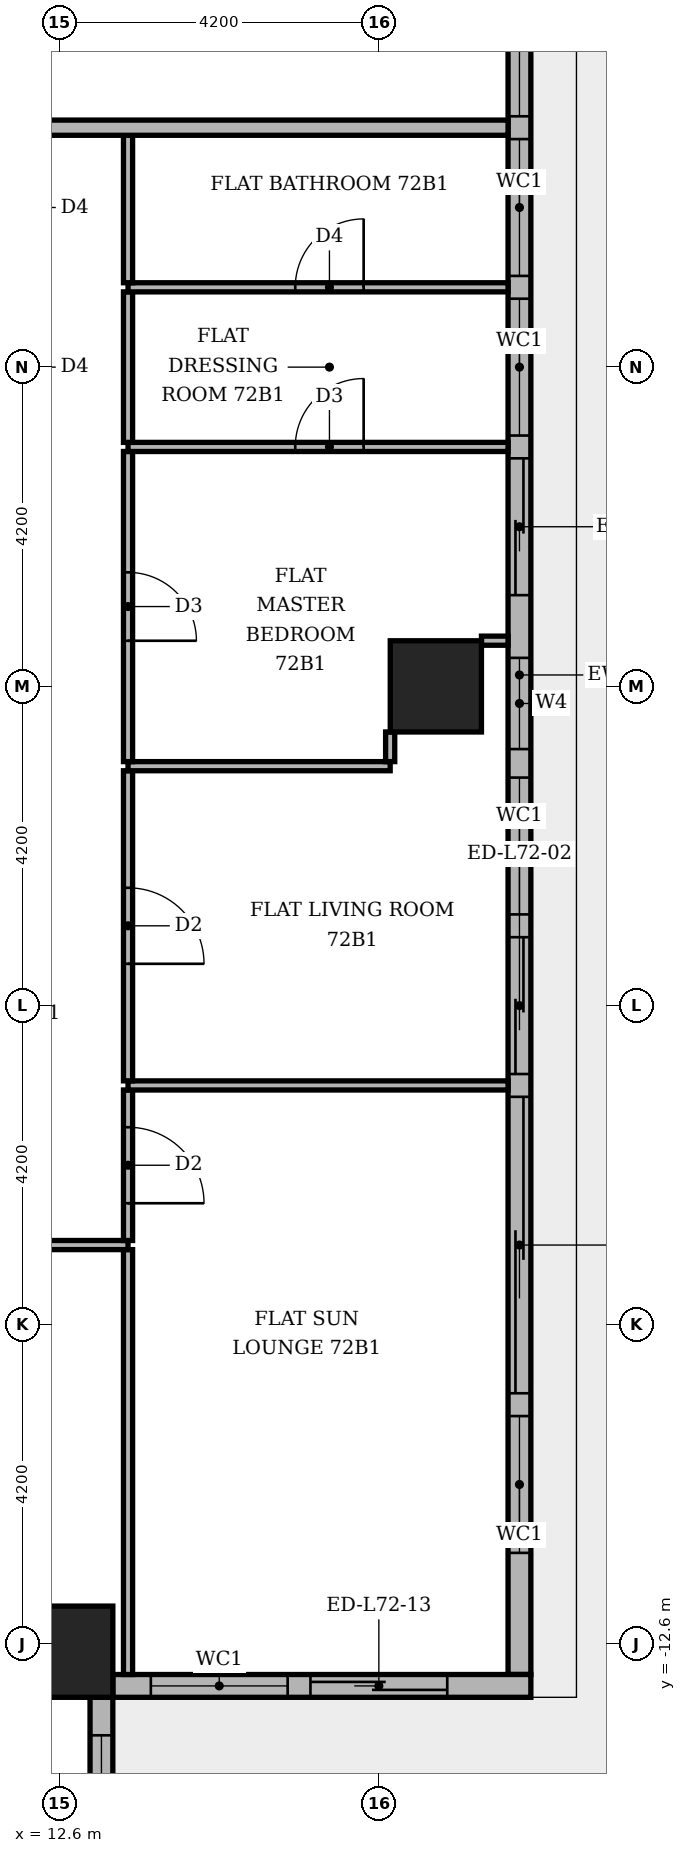
"""IFC4 building model, lengths in metres.
Left out: names, types, materials, properties, quantities, classifications, styles, units other than length and angle.
Written with IfcOpenShell. Run it as: python <this file> out.ifc"""

import sys

from ifc_helpers import new_model, si_unit, direction, frame, frame_2d, origin, origin_2d, place, context, subcontext, project, spatial, rectangle, extrude, element, fill, save


model = new_model("IFC4")
c1 = context("Model", 3, precision=1e-05, world=origin(), true_north=direction((0.0, 1.0)))
c2 = subcontext(c1, "Body", "Model", "MODEL_VIEW")
j1 = project(units=[si_unit("LENGTHUNIT", "METRE"), si_unit("PLANEANGLEUNIT", "RADIAN")], contexts=[c1])
p1 = place(None, origin())
s1 = spatial("IfcSite", under=j1, at=p1, CompositionType="ELEMENT")
p2 = place(p1, origin())
s2 = spatial("IfcBuilding", under=s1, at=p2, CompositionType="ELEMENT")
p3 = place(p2, frame((0.0, 0.0, 300.6)))
s3 = spatial("IfcBuildingStorey", under=s2, at=p3, CompositionType="ELEMENT", Elevation=300.6)
for number, where, z_axis, x_axis in (
    (1, (17.55, 0.0, -0.35), (0.0, 0.0, 1.0), (1.0, 0.0, 0.0)),
    (2, (12.7, -12.7, -0.35), (0.0, 0.0, 1.0), (1.0, 0.0, 0.0)),
):
    element("IfcColumn", number, at=place(p3, frame(where, z_axis=z_axis, x_axis=x_axis)), inside=s3, PredefinedType="COLUMN", context=c2, shape_type="SweptSolid", body=[
        extrude(rectangle(XDim=1.2, YDim=1.2, at=origin_2d()), origin(), (0.0, 0.0, 1.0), 4.25),
    ])
p4 = place(p3, frame((18.65, -13.0, 0.0), z_axis=(0.0, 0.0, 1.0), x_axis=(0.0, 1.0, 0.0)))
e3 = element("IfcWall", 3, at=p4, inside=s3, PredefinedType="STANDARD", context=c2, shape_type="SweptSolid", body=[
    extrude(rectangle(XDim=26.3, YDim=0.3, at=frame_2d((13.15, 0.0))), origin(), (0.0, 0.0, 1.0), 3.55),
])
p5 = place(p4, frame((1.6, 0.0, 0.6)))
e4 = element("IfcOpeningElement", 4, at=p5, cuts=e3, PredefinedType="OPENING", context=c2, shape_type="SweptSolid", body=[
    extrude(rectangle(XDim=1.8, YDim=2.4, at=frame_2d((0.9, 1.2))), frame((0.0, 0.16, 0.0), z_axis=(0.0, -1.0, 0.0), x_axis=(1.0, 0.0, 0.0)), (0.0, 0.0, 1.0), 0.32),
])
p6 = place(p4, frame((3.7, 0.0, 0.0)))
e5 = element("IfcOpeningElement", 5, at=p6, cuts=e3, PredefinedType="OPENING", context=c2, shape_type="SweptSolid", body=[
    extrude(rectangle(XDim=3.9, YDim=2.4, at=frame_2d((1.95, 1.2))), frame((0.0, 0.16, 0.0), z_axis=(0.0, -1.0, 0.0), x_axis=(1.0, 0.0, 0.0)), (0.0, 0.0, 1.0), 0.32),
])
p7 = place(p4, frame((7.9, 0.0, 0.0)))
e6 = element("IfcOpeningElement", 6, at=p7, cuts=e3, PredefinedType="OPENING", context=c2, shape_type="SweptSolid", body=[
    extrude(rectangle(XDim=1.8, YDim=2.4, at=frame_2d((0.9, 1.2))), frame((0.0, 0.16, 0.0), z_axis=(0.0, -1.0, 0.0), x_axis=(1.0, 0.0, 0.0)), (0.0, 0.0, 1.0), 0.32),
])
p8 = place(p4, frame((10.0, 0.0, 0.6)))
e7 = element("IfcOpeningElement", 7, at=p8, cuts=e3, PredefinedType="OPENING", context=c2, shape_type="SweptSolid", body=[
    extrude(rectangle(XDim=1.8, YDim=2.4, at=frame_2d((0.9, 1.2))), frame((0.0, 0.16, 0.0), z_axis=(0.0, -1.0, 0.0), x_axis=(1.0, 0.0, 0.0)), (0.0, 0.0, 1.0), 0.32),
])
p9 = place(p4, frame((14.2, 0.0, 0.0)))
e8 = element("IfcOpeningElement", 8, at=p9, cuts=e3, PredefinedType="OPENING", context=c2, shape_type="SweptSolid", body=[
    extrude(rectangle(XDim=1.8, YDim=2.4, at=frame_2d((0.9, 1.2))), frame((0.0, 0.16, 0.0), z_axis=(0.0, -1.0, 0.0), x_axis=(1.0, 0.0, 0.0)), (0.0, 0.0, 1.0), 0.32),
])
p10 = place(p4, frame((16.3, 0.0, 0.6)))
e9 = element("IfcOpeningElement", 9, at=p10, cuts=e3, PredefinedType="OPENING", context=c2, shape_type="SweptSolid", body=[
    extrude(rectangle(XDim=1.8, YDim=2.4, at=frame_2d((0.9, 1.2))), frame((0.0, 0.16, 0.0), z_axis=(0.0, -1.0, 0.0), x_axis=(1.0, 0.0, 0.0)), (0.0, 0.0, 1.0), 0.32),
])
p11 = place(p4, frame((18.4, 0.0, 0.6)))
e10 = element("IfcOpeningElement", 10, at=p11, cuts=e3, PredefinedType="OPENING", context=c2, shape_type="SweptSolid", body=[
    extrude(rectangle(XDim=1.8, YDim=2.4, at=frame_2d((0.9, 1.2))), frame((0.0, 0.16, 0.0), z_axis=(0.0, -1.0, 0.0), x_axis=(1.0, 0.0, 0.0)), (0.0, 0.0, 1.0), 0.32),
])
p12 = place(p4, frame((20.5, 0.0, 0.6)))
e11 = element("IfcOpeningElement", 11, at=p12, cuts=e3, PredefinedType="OPENING", context=c2, shape_type="SweptSolid", body=[
    extrude(rectangle(XDim=3.9, YDim=2.4, at=frame_2d((1.95, 1.2))), frame((0.0, 0.16, 0.0), z_axis=(0.0, -1.0, 0.0), x_axis=(1.0, 0.0, 0.0)), (0.0, 0.0, 1.0), 0.32),
])
p13 = place(p4, frame((12.175, 0.0, 0.9)))
e12 = element("IfcOpeningElement", 12, at=p13, cuts=e3, PredefinedType="OPENING", context=c2, shape_type="SweptSolid", body=[
    extrude(rectangle(XDim=1.2, YDim=2.1, at=frame_2d((0.6, 1.05))), frame((0.0, 0.16, 0.0), z_axis=(0.0, -1.0, 0.0), x_axis=(1.0, 0.0, 0.0)), (0.0, 0.0, 1.0), 0.32),
])
p14 = place(p3, frame((13.15, -18.5, 0.0), z_axis=(0.0, 0.0, 1.0), x_axis=(0.0, 1.0, 0.0)))
e13 = element("IfcWall", 13, at=p14, inside=s3, PredefinedType="STANDARD", context=c2, shape_type="SweptSolid", body=[
    extrude(rectangle(XDim=5.2, YDim=0.3, at=frame_2d((2.6, 0.0))), origin(), (0.0, 0.0, 1.0), 3.55),
])
p15 = place(p14, frame((0.8, 0.0, 0.6)))
e14 = element("IfcOpeningElement", 14, at=p15, cuts=e13, PredefinedType="OPENING", context=c2, shape_type="SweptSolid", body=[
    extrude(rectangle(XDim=3.9, YDim=2.4, at=frame_2d((1.95, 1.2))), frame((0.0, 0.16, 0.0), z_axis=(0.0, -1.0, 0.0), x_axis=(1.0, 0.0, 0.0)), (0.0, 0.0, 1.0), 0.32),
])
p16 = place(p3, frame((13.3, -13.15, 0.0), z_axis=(0.0, 0.0, 1.0), x_axis=(1.0, 0.0, 0.0)))
e15 = element("IfcWall", 15, at=p16, inside=s3, PredefinedType="STANDARD", context=c2, shape_type="SweptSolid", body=[
    extrude(rectangle(XDim=5.5, YDim=0.3, at=frame_2d((2.75, 0.0))), origin(), (0.0, 0.0, 1.0), 3.55),
])
p17 = place(p16, frame((0.5, 0.0, 0.6)))
e16 = element("IfcOpeningElement", 16, at=p17, cuts=e15, PredefinedType="OPENING", context=c2, shape_type="SweptSolid", body=[
    extrude(rectangle(XDim=1.8, YDim=2.4, at=frame_2d((0.9, 1.2))), frame((0.0, 0.16, 0.0), z_axis=(0.0, -1.0, 0.0), x_axis=(1.0, 0.0, 0.0)), (0.0, 0.0, 1.0), 0.32),
])
p18 = place(p16, frame((2.6, 0.0, 0.0)))
e17 = element("IfcOpeningElement", 17, at=p18, cuts=e15, PredefinedType="OPENING", context=c2, shape_type="SweptSolid", body=[
    extrude(rectangle(XDim=1.8, YDim=2.4, at=frame_2d((0.9, 1.2))), frame((0.0, 0.16, 0.0), z_axis=(0.0, -1.0, 0.0), x_axis=(1.0, 0.0, 0.0)), (0.0, 0.0, 1.0), 0.32),
])
p19 = place(p3, frame((13.5, -13.0, 0.0), z_axis=(0.0, 0.0, 1.0), x_axis=(0.0, 1.0, 0.0)))
e18 = element("IfcWall", 18, at=p19, inside=s3, PredefinedType="PARTITIONING", context=c2, shape_type="SweptSolid", body=[
    extrude(rectangle(XDim=5.59, YDim=0.12, at=frame_2d((2.795, 0.0))), origin(), (0.0, 0.0, 1.0), 3.55),
])
p20 = place(p3, frame((7.35, -7.35, 0.0), z_axis=(0.0, 0.0, 1.0), x_axis=(1.0, 0.0, 0.0)))
e19 = element("IfcWall", 19, at=p20, inside=s3, PredefinedType="PARTITIONING", context=c2, shape_type="SweptSolid", body=[
    extrude(rectangle(XDim=6.15, YDim=0.12, at=frame_2d((3.075, 0.0))), origin(), (0.0, 0.0, 1.0), 3.55),
])
p21 = place(p20, frame((2.625, 0.0, 0.0)))
e20 = element("IfcOpeningElement", 20, at=p21, cuts=e19, PredefinedType="OPENING", context=c2, shape_type="SweptSolid", body=[
    extrude(rectangle(XDim=0.9, YDim=2.1, at=frame_2d((0.45, 1.05))), frame((0.0, 0.07, 0.0), z_axis=(0.0, -1.0, 0.0), x_axis=(1.0, 0.0, 0.0)), (0.0, 0.0, 1.0), 0.14),
])
p22 = place(p3, frame((13.5, -7.29, 0.0), z_axis=(0.0, 0.0, 1.0), x_axis=(0.0, 1.0, 0.0)))
e21 = element("IfcWall", 21, at=p22, inside=s3, PredefinedType="PARTITIONING", context=c2, shape_type="SweptSolid", body=[
    extrude(rectangle(XDim=1.98, YDim=0.12, at=frame_2d((0.99, 0.0))), origin(), (0.0, 0.0, 1.0), 3.55),
])
p23 = place(p22, frame((0.49, 0.0, 0.0)))
e22 = element("IfcOpeningElement", 22, at=p23, cuts=e21, PredefinedType="OPENING", context=c2, shape_type="SweptSolid", body=[
    extrude(rectangle(XDim=1.0, YDim=2.1, at=frame_2d((0.5, 1.05))), frame((0.0, 0.07, 0.0), z_axis=(0.0, -1.0, 0.0), x_axis=(1.0, 0.0, 0.0)), (0.0, 0.0, 1.0), 0.14),
])
p24 = place(p3, frame((13.5, -5.25, 0.0), z_axis=(0.0, 0.0, 1.0), x_axis=(1.0, 0.0, 0.0)))
e23 = element("IfcWall", 23, at=p24, inside=s3, PredefinedType="PARTITIONING", context=c2, shape_type="SweptSolid", body=[
    extrude(rectangle(XDim=5.0, YDim=0.12, at=frame_2d((2.5, 0.0))), origin(), (0.0, 0.0, 1.0), 3.55),
])
p25 = place(p3, frame((13.5, -5.19, 0.0), z_axis=(0.0, 0.0, 1.0), x_axis=(0.0, 1.0, 0.0)))
e24 = element("IfcWall", 24, at=p25, inside=s3, PredefinedType="PARTITIONING", context=c2, shape_type="SweptSolid", body=[
    extrude(rectangle(XDim=4.08, YDim=0.12, at=frame_2d((2.04, 0.0))), origin(), (0.0, 0.0, 1.0), 3.55),
])
p26 = place(p25, frame((1.54, 0.0, 0.0)))
e25 = element("IfcOpeningElement", 25, at=p26, cuts=e24, PredefinedType="OPENING", context=c2, shape_type="SweptSolid", body=[
    extrude(rectangle(XDim=1.0, YDim=2.1, at=frame_2d((0.5, 1.05))), frame((0.0, 0.07, 0.0), z_axis=(0.0, -1.0, 0.0), x_axis=(1.0, 0.0, 0.0)), (0.0, 0.0, 1.0), 0.14),
])
p27 = place(p3, frame((13.5, -1.05, 0.0), z_axis=(0.0, 0.0, 1.0), x_axis=(1.0, 0.0, 0.0)))
e26 = element("IfcWall", 26, at=p27, inside=s3, PredefinedType="PARTITIONING", context=c2, shape_type="SweptSolid", body=[
    extrude(rectangle(XDim=3.449, YDim=0.12, at=frame_2d((1.725, 0.0))), origin(), (0.0, 0.0, 1.0), 3.55),
])
p28 = place(p3, frame((13.5, -0.99, 0.0), z_axis=(0.0, 0.0, 1.0), x_axis=(0.0, 1.0, 0.0)))
e27 = element("IfcWall", 27, at=p28, inside=s3, PredefinedType="PARTITIONING", context=c2, shape_type="SweptSolid", body=[
    extrude(rectangle(XDim=4.08, YDim=0.12, at=frame_2d((2.04, 0.0))), origin(), (0.0, 0.0, 1.0), 3.55),
])
p29 = place(p28, frame((1.59, 0.0, 0.0)))
e28 = element("IfcOpeningElement", 28, at=p29, cuts=e27, PredefinedType="OPENING", context=c2, shape_type="SweptSolid", body=[
    extrude(rectangle(XDim=0.9, YDim=2.1, at=frame_2d((0.45, 1.05))), frame((0.0, 0.07, 0.0), z_axis=(0.0, -1.0, 0.0), x_axis=(1.0, 0.0, 0.0)), (0.0, 0.0, 1.0), 0.14),
])
p30 = place(p3, frame((16.949, -0.99, 0.0), z_axis=(0.0, 0.0, 1.0), x_axis=(0.0, 1.0, 0.0)))
e29 = element("IfcWall", 29, at=p30, inside=s3, PredefinedType="PARTITIONING", context=c2, shape_type="SweptSolid", body=[
    extrude(rectangle(XDim=0.39, YDim=0.12, at=frame_2d((0.195, 0.0))), origin(), (0.0, 0.0, 1.0), 3.55),
])
p31 = place(p3, frame((18.15, 0.601, 0.0), z_axis=(0.0, 0.0, 1.0), x_axis=(1.0, 0.0, 0.0)))
e30 = element("IfcWall", 30, at=p31, inside=s3, PredefinedType="PARTITIONING", context=c2, shape_type="SweptSolid", body=[
    extrude(rectangle(XDim=0.35, YDim=0.12, at=frame_2d((0.175, 0.0))), origin(), (0.0, 0.0, 1.0), 3.55),
])
p32 = place(p3, frame((13.5, 3.15, 0.0), z_axis=(0.0, 0.0, 1.0), x_axis=(1.0, 0.0, 0.0)))
e31 = element("IfcWall", 31, at=p32, inside=s3, PredefinedType="PARTITIONING", context=c2, shape_type="SweptSolid", body=[
    extrude(rectangle(XDim=5.0, YDim=0.12, at=frame_2d((2.5, 0.0))), origin(), (0.0, 0.0, 1.0), 3.55),
])
p33 = place(p32, frame((2.2, 0.0, 0.0)))
e32 = element("IfcOpeningElement", 32, at=p33, cuts=e31, PredefinedType="OPENING", context=c2, shape_type="SweptSolid", body=[
    extrude(rectangle(XDim=0.9, YDim=2.1, at=frame_2d((0.45, 1.05))), frame((0.0, 0.07, 0.0), z_axis=(0.0, -1.0, 0.0), x_axis=(1.0, 0.0, 0.0)), (0.0, 0.0, 1.0), 0.14),
])
p34 = place(p3, frame((13.5, 3.21, 0.0), z_axis=(0.0, 0.0, 1.0), x_axis=(0.0, 1.0, 0.0)))
e33 = element("IfcWall", 33, at=p34, inside=s3, PredefinedType="PARTITIONING", context=c2, shape_type="SweptSolid", body=[
    extrude(rectangle(XDim=1.98, YDim=0.12, at=frame_2d((0.99, 0.0))), origin(), (0.0, 0.0, 1.0), 3.55),
])
p35 = place(p3, frame((13.5, 5.25, 0.0), z_axis=(0.0, 0.0, 1.0), x_axis=(1.0, 0.0, 0.0)))
e34 = element("IfcWall", 34, at=p35, inside=s3, PredefinedType="PARTITIONING", context=c2, shape_type="SweptSolid", body=[
    extrude(rectangle(XDim=5.0, YDim=0.12, at=frame_2d((2.5, 0.0))), origin(), (0.0, 0.0, 1.0), 3.55),
])
p36 = place(p35, frame((2.2, 0.0, 0.0)))
e35 = element("IfcOpeningElement", 35, at=p36, cuts=e34, PredefinedType="OPENING", context=c2, shape_type="SweptSolid", body=[
    extrude(rectangle(XDim=0.9, YDim=2.1, at=frame_2d((0.45, 1.05))), frame((0.0, 0.07, 0.0), z_axis=(0.0, -1.0, 0.0), x_axis=(1.0, 0.0, 0.0)), (0.0, 0.0, 1.0), 0.14),
])
p37 = place(p3, frame((13.5, 5.31, 0.0), z_axis=(0.0, 0.0, 1.0), x_axis=(0.0, 1.0, 0.0)))
e36 = element("IfcWall", 36, at=p37, inside=s3, PredefinedType="PARTITIONING", context=c2, shape_type="SweptSolid", body=[
    extrude(rectangle(XDim=1.94, YDim=0.12, at=frame_2d((0.97, 0.0))), origin(), (0.0, 0.0, 1.0), 3.55),
])
p38 = place(p3, frame((1.3, 7.35, 0.0), z_axis=(0.0, 0.0, 1.0), x_axis=(1.0, 0.0, 0.0)))
e37 = element("IfcWall", 37, at=p38, inside=s3, PredefinedType="PARTITIONING", context=c2, shape_type="SweptSolid", body=[
    extrude(rectangle(XDim=17.2, YDim=0.2, at=frame_2d((8.6, 0.0))), origin(), (0.0, 0.0, 1.0), 3.55),
])
p39 = place(p38, frame((2.475, 0.0, 0.0)))
e38 = element("IfcOpeningElement", 38, at=p39, cuts=e37, PredefinedType="OPENING", context=c2, shape_type="SweptSolid", body=[
    extrude(rectangle(XDim=1.1, YDim=2.4, at=frame_2d((0.55, 1.2))), frame((0.0, 0.11, 0.0), z_axis=(0.0, -1.0, 0.0), x_axis=(1.0, 0.0, 0.0)), (0.0, 0.0, 1.0), 0.22),
])
p40 = place(p5, origin())
e39 = element("IfcWindow", 39, at=p40, inside=s3, PartitioningType="SINGLE_PANEL", PredefinedType="WINDOW", context=c2, shape_type="SweptSolid", body=[
    extrude(rectangle(XDim=1.8, YDim=2.4, at=frame_2d((0.9, 1.2))), frame((0.0, 0.03, 0.0), z_axis=(0.0, -1.0, 0.0), x_axis=(1.0, 0.0, 0.0)), (0.0, 0.0, 1.0), 0.06),
])
fill(e4, e39)
p41 = place(p6, origin())
e40 = element("IfcDoor", 40, at=p41, inside=s3, OperationType="SLIDING_TO_LEFT", PredefinedType="DOOR", context=c2, shape_type="SweptSolid", body=[
    extrude(rectangle(XDim=3.9, YDim=2.4, at=frame_2d((1.95, 1.2))), frame((0.0, 0.025, 0.0), z_axis=(0.0, -1.0, 0.0), x_axis=(1.0, 0.0, 0.0)), (0.0, 0.0, 1.0), 0.05),
])
fill(e5, e40)
p42 = place(p7, origin())
e41 = element("IfcDoor", 41, at=p42, inside=s3, OperationType="SLIDING_TO_LEFT", PredefinedType="DOOR", context=c2, shape_type="SweptSolid", body=[
    extrude(rectangle(XDim=1.8, YDim=2.4, at=frame_2d((0.9, 1.2))), frame((0.0, 0.025, 0.0), z_axis=(0.0, -1.0, 0.0), x_axis=(1.0, 0.0, 0.0)), (0.0, 0.0, 1.0), 0.05),
])
fill(e6, e41)
p43 = place(p8, origin())
e42 = element("IfcWindow", 42, at=p43, inside=s3, PartitioningType="SINGLE_PANEL", PredefinedType="WINDOW", context=c2, shape_type="SweptSolid", body=[
    extrude(rectangle(XDim=1.8, YDim=2.4, at=frame_2d((0.9, 1.2))), frame((0.0, 0.03, 0.0), z_axis=(0.0, -1.0, 0.0), x_axis=(1.0, 0.0, 0.0)), (0.0, 0.0, 1.0), 0.06),
])
fill(e7, e42)
p44 = place(p9, origin())
e43 = element("IfcDoor", 43, at=p44, inside=s3, OperationType="SLIDING_TO_LEFT", PredefinedType="DOOR", context=c2, shape_type="SweptSolid", body=[
    extrude(rectangle(XDim=1.8, YDim=2.4, at=frame_2d((0.9, 1.2))), frame((0.0, 0.025, 0.0), z_axis=(0.0, -1.0, 0.0), x_axis=(1.0, 0.0, 0.0)), (0.0, 0.0, 1.0), 0.05),
])
fill(e8, e43)
p45 = place(p10, origin())
e44 = element("IfcWindow", 44, at=p45, inside=s3, PartitioningType="SINGLE_PANEL", PredefinedType="WINDOW", context=c2, shape_type="SweptSolid", body=[
    extrude(rectangle(XDim=1.8, YDim=2.4, at=frame_2d((0.9, 1.2))), frame((0.0, 0.03, 0.0), z_axis=(0.0, -1.0, 0.0), x_axis=(1.0, 0.0, 0.0)), (0.0, 0.0, 1.0), 0.06),
])
fill(e9, e44)
p46 = place(p11, origin())
e45 = element("IfcWindow", 45, at=p46, inside=s3, PartitioningType="SINGLE_PANEL", PredefinedType="WINDOW", context=c2, shape_type="SweptSolid", body=[
    extrude(rectangle(XDim=1.8, YDim=2.4, at=frame_2d((0.9, 1.2))), frame((0.0, 0.03, 0.0), z_axis=(0.0, -1.0, 0.0), x_axis=(1.0, 0.0, 0.0)), (0.0, 0.0, 1.0), 0.06),
])
fill(e10, e45)
p47 = place(p12, origin())
e46 = element("IfcWindow", 46, at=p47, inside=s3, PartitioningType="SINGLE_PANEL", PredefinedType="WINDOW", context=c2, shape_type="SweptSolid", body=[
    extrude(rectangle(XDim=3.9, YDim=2.4, at=frame_2d((1.95, 1.2))), frame((0.0, 0.03, 0.0), z_axis=(0.0, -1.0, 0.0), x_axis=(1.0, 0.0, 0.0)), (0.0, 0.0, 1.0), 0.06),
])
fill(e11, e46)
p48 = place(p13, origin())
e47 = element("IfcWindow", 47, at=p48, inside=s3, PartitioningType="SINGLE_PANEL", PredefinedType="WINDOW", context=c2, shape_type="SweptSolid", body=[
    extrude(rectangle(XDim=1.2, YDim=2.1, at=frame_2d((0.6, 1.05))), frame((0.0, 0.03, 0.0), z_axis=(0.0, -1.0, 0.0), x_axis=(1.0, 0.0, 0.0)), (0.0, 0.0, 1.0), 0.06),
])
fill(e12, e47)
p49 = place(p15, origin())
e48 = element("IfcWindow", 48, at=p49, inside=s3, PartitioningType="SINGLE_PANEL", PredefinedType="WINDOW", context=c2, shape_type="SweptSolid", body=[
    extrude(rectangle(XDim=3.9, YDim=2.4, at=frame_2d((1.95, 1.2))), frame((0.0, 0.03, 0.0), z_axis=(0.0, -1.0, 0.0), x_axis=(1.0, 0.0, 0.0)), (0.0, 0.0, 1.0), 0.06),
])
fill(e14, e48)
p50 = place(p17, origin())
e49 = element("IfcWindow", 49, at=p50, inside=s3, PartitioningType="SINGLE_PANEL", PredefinedType="WINDOW", context=c2, shape_type="SweptSolid", body=[
    extrude(rectangle(XDim=1.8, YDim=2.4, at=frame_2d((0.9, 1.2))), frame((0.0, 0.03, 0.0), z_axis=(0.0, -1.0, 0.0), x_axis=(1.0, 0.0, 0.0)), (0.0, 0.0, 1.0), 0.06),
])
fill(e16, e49)
p51 = place(p18, origin())
e50 = element("IfcDoor", 50, at=p51, inside=s3, OperationType="SLIDING_TO_LEFT", PredefinedType="DOOR", context=c2, shape_type="SweptSolid", body=[
    extrude(rectangle(XDim=1.8, YDim=2.4, at=frame_2d((0.9, 1.2))), frame((0.0, 0.025, 0.0), z_axis=(0.0, -1.0, 0.0), x_axis=(1.0, 0.0, 0.0)), (0.0, 0.0, 1.0), 0.05),
])
fill(e17, e50)
p52 = place(p23, frame((1.0, 0.0, 0.0), z_axis=(0.0, 0.0, 1.0), x_axis=(-1.0, 0.0, 0.0)))
e51 = element("IfcDoor", 51, at=p52, inside=s3, OperationType="SINGLE_SWING_LEFT", PredefinedType="DOOR", context=c2, shape_type="SweptSolid", body=[
    extrude(rectangle(XDim=1.0, YDim=2.1, at=frame_2d((0.5, 1.05))), frame((0.0, 0.025, 0.0), z_axis=(0.0, -1.0, 0.0), x_axis=(1.0, 0.0, 0.0)), (0.0, 0.0, 1.0), 0.05),
])
fill(e22, e51)
p53 = place(p26, frame((1.0, 0.0, 0.0), z_axis=(0.0, 0.0, 1.0), x_axis=(-1.0, 0.0, 0.0)))
e52 = element("IfcDoor", 52, at=p53, inside=s3, OperationType="SINGLE_SWING_LEFT", PredefinedType="DOOR", context=c2, shape_type="SweptSolid", body=[
    extrude(rectangle(XDim=1.0, YDim=2.1, at=frame_2d((0.5, 1.05))), frame((0.0, 0.025, 0.0), z_axis=(0.0, -1.0, 0.0), x_axis=(1.0, 0.0, 0.0)), (0.0, 0.0, 1.0), 0.05),
])
fill(e25, e52)
p54 = place(p29, frame((0.9, 0.0, 0.0), z_axis=(0.0, 0.0, 1.0), x_axis=(-1.0, 0.0, 0.0)))
e53 = element("IfcDoor", 53, at=p54, inside=s3, OperationType="SINGLE_SWING_LEFT", PredefinedType="DOOR", context=c2, shape_type="SweptSolid", body=[
    extrude(rectangle(XDim=0.9, YDim=2.1, at=frame_2d((0.45, 1.05))), frame((0.0, 0.025, 0.0), z_axis=(0.0, -1.0, 0.0), x_axis=(1.0, 0.0, 0.0)), (0.0, 0.0, 1.0), 0.05),
])
fill(e28, e53)
p55 = place(p33, origin())
e54 = element("IfcDoor", 54, at=p55, inside=s3, OperationType="SINGLE_SWING_RIGHT", PredefinedType="DOOR", context=c2, shape_type="SweptSolid", body=[
    extrude(rectangle(XDim=0.9, YDim=2.1, at=frame_2d((0.45, 1.05))), frame((0.0, 0.025, 0.0), z_axis=(0.0, -1.0, 0.0), x_axis=(1.0, 0.0, 0.0)), (0.0, 0.0, 1.0), 0.05),
])
fill(e32, e54)
p56 = place(p36, origin())
e55 = element("IfcDoor", 55, at=p56, inside=s3, OperationType="SINGLE_SWING_RIGHT", PredefinedType="DOOR", context=c2, shape_type="SweptSolid", body=[
    extrude(rectangle(XDim=0.9, YDim=2.1, at=frame_2d((0.45, 1.05))), frame((0.0, 0.025, 0.0), z_axis=(0.0, -1.0, 0.0), x_axis=(1.0, 0.0, 0.0)), (0.0, 0.0, 1.0), 0.05),
])
fill(e35, e55)
save(model, sys.argv[1])
